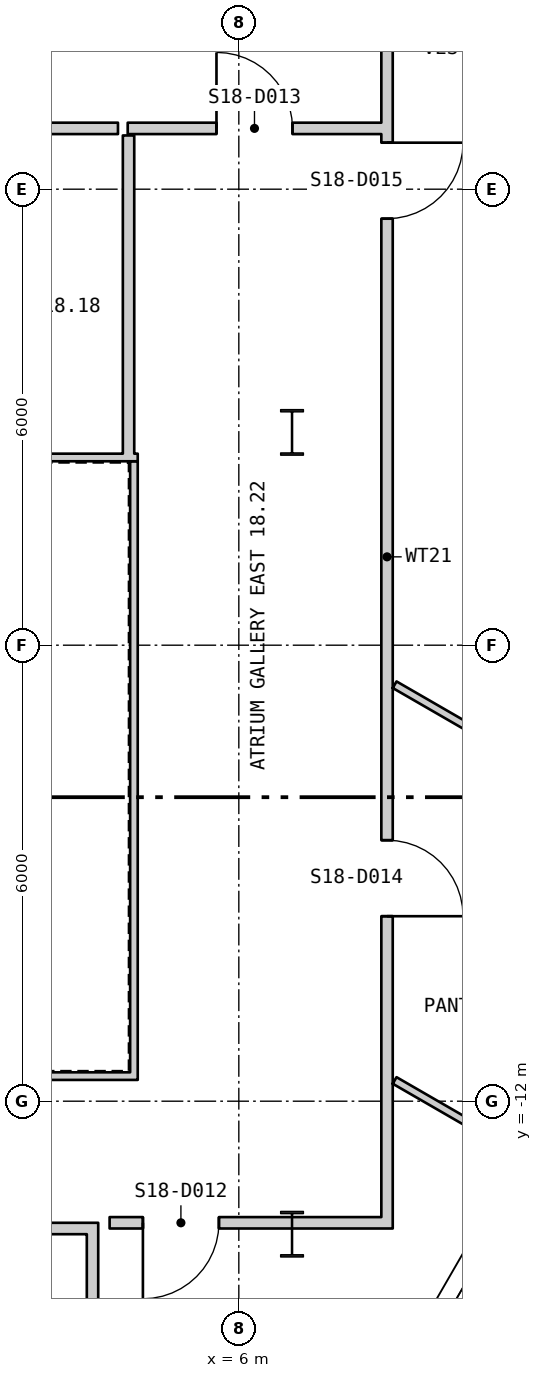
"""IFC4 building model, lengths in metres.
Left out: names, types, materials, properties, quantities, classifications, styles, units other than length and angle.
Written with IfcOpenShell. Run it as: python <this file> out.ifc"""

import sys

from ifc_helpers import new_model, si_unit, direction, frame, frame_2d, origin, origin_2d, place, context, subcontext, project, spatial, polyline, rectangle, i_section, outline, extrude, element, fill, save


model = new_model("IFC4")
c1 = context("Model", 3, precision=1e-05, world=origin(), true_north=direction((0.0, 1.0)))
c2 = subcontext(c1, "Body", "Model", "MODEL_VIEW")
j1 = project(units=[si_unit("LENGTHUNIT", "METRE"), si_unit("PLANEANGLEUNIT", "RADIAN")], contexts=[c1])
p1 = place(None, origin())
s1 = spatial("IfcSite", under=j1, at=p1, CompositionType="ELEMENT")
p2 = place(p1, origin())
s2 = spatial("IfcBuilding", under=s1, at=p2, CompositionType="ELEMENT")
p3 = place(p2, frame((0.0, 0.0, 245.4)))
s3 = spatial("IfcBuildingStorey", under=s2, at=p3, CompositionType="ELEMENT", Elevation=245.4)
for number, where, z_axis, x_axis in (
    (1, (6.7, -3.2, 0.0), (0.0, 0.0, 1.0), (1.0, 0.0, 0.0)),
    (2, (6.7, -13.75, 0.0), (0.0, 0.0, 1.0), (1.0, 0.0, 0.0)),
):
    element("IfcColumn", number, at=place(p3, frame(where, z_axis=z_axis, x_axis=x_axis)), inside=s3, PredefinedType="COLUMN", context=c2, shape_type="SweptSolid", body=[
        extrude(i_section(OverallWidth=0.3, OverallDepth=0.6, WebThickness=0.015, FlangeThickness=0.03, at=origin_2d()), origin(), (0.0, 0.0, 1.0), 3.9),
    ])
p4 = place(p3, frame((2.975, -24.799, -0.18), z_axis=(0.0, 0.0, 1.0), x_axis=(0.500000335318, 0.866025210188, 0.0)))
e3 = element("IfcWall", 3, at=p4, inside=s3, PredefinedType="SOLIDWALL", context=c2, shape_type="SweptSolid", body=[
    extrude(outline(polyline([(-0.13, -0.225), (45.88, -0.225), (45.62, 0.225), (0.13, 0.225), (-0.13, -0.225)])), origin(), (0.0, 0.0, 1.0), 3.68),
])
p5 = place(p4, frame((1.425, 0.0, 1.08)))
e4 = element("IfcOpeningElement", 4, at=p5, cuts=e3, PredefinedType="OPENING", context=c2, shape_type="SweptSolid", body=[
    extrude(rectangle(XDim=2.4, YDim=2.0, at=frame_2d((1.2, 1.0))), frame((0.0, 0.235, 0.0), z_axis=(0.0, -1.0, 0.0), x_axis=(1.0, 0.0, 0.0)), (0.0, 0.0, 1.0), 0.47),
])
p6 = place(p4, frame((5.895, 0.0, 1.08)))
e5 = element("IfcOpeningElement", 5, at=p6, cuts=e3, PredefinedType="OPENING", context=c2, shape_type="SweptSolid", body=[
    extrude(rectangle(XDim=2.4, YDim=2.0, at=frame_2d((1.2, 1.0))), frame((0.0, 0.235, 0.0), z_axis=(0.0, -1.0, 0.0), x_axis=(1.0, 0.0, 0.0)), (0.0, 0.0, 1.0), 0.47),
])
p7 = place(p4, frame((10.403, 0.0, 1.08)))
e6 = element("IfcOpeningElement", 6, at=p7, cuts=e3, PredefinedType="OPENING", context=c2, shape_type="SweptSolid", body=[
    extrude(rectangle(XDim=2.4, YDim=2.0, at=frame_2d((1.2, 1.0))), frame((0.0, 0.235, 0.0), z_axis=(0.0, -1.0, 0.0), x_axis=(1.0, 0.0, 0.0)), (0.0, 0.0, 1.0), 0.47),
])
p8 = place(p4, frame((14.912, 0.0, 1.08)))
e7 = element("IfcOpeningElement", 7, at=p8, cuts=e3, PredefinedType="OPENING", context=c2, shape_type="SweptSolid", body=[
    extrude(rectangle(XDim=2.4, YDim=2.0, at=frame_2d((1.2, 1.0))), frame((0.0, 0.235, 0.0), z_axis=(0.0, -1.0, 0.0), x_axis=(1.0, 0.0, 0.0)), (0.0, 0.0, 1.0), 0.47),
])
p9 = place(p4, frame((19.421, 0.0, 1.08)))
e8 = element("IfcOpeningElement", 8, at=p9, cuts=e3, PredefinedType="OPENING", context=c2, shape_type="SweptSolid", body=[
    extrude(rectangle(XDim=2.4, YDim=2.0, at=frame_2d((1.2, 1.0))), frame((0.0, 0.235, 0.0), z_axis=(0.0, -1.0, 0.0), x_axis=(1.0, 0.0, 0.0)), (0.0, 0.0, 1.0), 0.47),
])
p10 = place(p4, frame((23.929, 0.0, 1.08)))
e9 = element("IfcOpeningElement", 9, at=p10, cuts=e3, PredefinedType="OPENING", context=c2, shape_type="SweptSolid", body=[
    extrude(rectangle(XDim=2.4, YDim=2.0, at=frame_2d((1.2, 1.0))), frame((0.0, 0.235, 0.0), z_axis=(0.0, -1.0, 0.0), x_axis=(1.0, 0.0, 0.0)), (0.0, 0.0, 1.0), 0.47),
])
p11 = place(p4, frame((28.438, 0.0, 1.08)))
e10 = element("IfcOpeningElement", 10, at=p11, cuts=e3, PredefinedType="OPENING", context=c2, shape_type="SweptSolid", body=[
    extrude(rectangle(XDim=2.4, YDim=2.0, at=frame_2d((1.2, 1.0))), frame((0.0, 0.235, 0.0), z_axis=(0.0, -1.0, 0.0), x_axis=(1.0, 0.0, 0.0)), (0.0, 0.0, 1.0), 0.47),
])
p12 = place(p4, frame((32.947, 0.0, 1.08)))
e11 = element("IfcOpeningElement", 11, at=p12, cuts=e3, PredefinedType="OPENING", context=c2, shape_type="SweptSolid", body=[
    extrude(rectangle(XDim=2.4, YDim=2.0, at=frame_2d((1.2, 1.0))), frame((0.0, 0.235, 0.0), z_axis=(0.0, -1.0, 0.0), x_axis=(1.0, 0.0, 0.0)), (0.0, 0.0, 1.0), 0.47),
])
p13 = place(p4, frame((37.455, 0.0, 1.08)))
e12 = element("IfcOpeningElement", 12, at=p13, cuts=e3, PredefinedType="OPENING", context=c2, shape_type="SweptSolid", body=[
    extrude(rectangle(XDim=2.4, YDim=2.0, at=frame_2d((1.2, 1.0))), frame((0.0, 0.235, 0.0), z_axis=(0.0, -1.0, 0.0), x_axis=(1.0, 0.0, 0.0)), (0.0, 0.0, 1.0), 0.47),
])
p14 = place(p4, frame((41.925, 0.0, 1.08)))
e13 = element("IfcOpeningElement", 13, at=p14, cuts=e3, PredefinedType="OPENING", context=c2, shape_type="SweptSolid", body=[
    extrude(rectangle(XDim=2.4, YDim=2.0, at=frame_2d((1.2, 1.0))), frame((0.0, 0.235, 0.0), z_axis=(0.0, -1.0, 0.0), x_axis=(1.0, 0.0, 0.0)), (0.0, 0.0, 1.0), 0.47),
])
p15 = place(p3, frame((-4.67, -11.67, 0.0), z_axis=(0.0, 0.0, 1.0), x_axis=(1.0, 0.0, 0.0)))
e14 = element("IfcWall", 14, at=p15, inside=s3, PredefinedType="PARTITIONING", context=c2, shape_type="SweptSolid", body=[
    extrude(rectangle(XDim=9.34, YDim=0.1, at=frame_2d((4.67, 0.0))), origin(), (0.0, 0.0, 1.0), 3.7),
])
p16 = place(p3, frame((4.62, -11.62, 0.0), z_axis=(0.0, 0.0, 1.0), x_axis=(0.0, 1.0, 0.0)))
e15 = element("IfcWall", 15, at=p16, inside=s3, PredefinedType="PARTITIONING", context=c2, shape_type="SweptSolid", body=[
    extrude(rectangle(XDim=8.04, YDim=0.1, at=frame_2d((4.02, 0.0))), origin(), (0.0, 0.0, 1.0), 3.7),
])
p17 = place(p3, frame((4.67, -3.53, 0.0), z_axis=(0.0, 0.0, 1.0), x_axis=(-1.0, 0.0, 0.0)))
e16 = element("IfcWall", 16, at=p17, inside=s3, PredefinedType="PARTITIONING", context=c2, shape_type="SweptSolid", body=[
    extrude(rectangle(XDim=9.34, YDim=0.1, at=frame_2d((4.67, 0.0))), origin(), (0.0, 0.0, 1.0), 3.7),
])
p18 = place(p3, frame((4.075, -16.15, 0.0), z_axis=(0.0, 0.0, 1.0), x_axis=(0.0, 1.0, 0.0)))
e17 = element("IfcWall", 17, at=p18, inside=s3, PredefinedType="PARTITIONING", context=c2, shape_type="SweptSolid", body=[
    extrude(rectangle(XDim=2.4, YDim=0.15, at=frame_2d((1.2, 0.0))), origin(), (0.0, 0.0, 1.0), 3.7),
])
p19 = place(p3, frame((1.55, -13.675, 0.0), z_axis=(0.0, 0.0, 1.0), x_axis=(1.0, 0.0, 0.0)))
e18 = element("IfcWall", 18, at=p19, inside=s3, PredefinedType="PARTITIONING", context=c2, shape_type="SweptSolid", body=[
    extrude(rectangle(XDim=2.6, YDim=0.15, at=frame_2d((1.3, 0.0))), origin(), (0.0, 0.0, 1.0), 2.91),
])
p20 = place(p19, frame((0.675, 0.0, 0.0)))
e19 = element("IfcOpeningElement", 19, at=p20, cuts=e18, PredefinedType="OPENING", context=c2, shape_type="SweptSolid", body=[
    extrude(rectangle(XDim=1.25, YDim=2.1, at=frame_2d((0.625, 1.05))), frame((0.0, 0.085, 0.0), z_axis=(0.0, -1.0, 0.0), x_axis=(1.0, 0.0, 0.0)), (0.0, 0.0, 1.0), 0.17),
])
p21 = place(p3, frame((-4.41, 0.8, 0.0), z_axis=(0.0, 0.0, 1.0), x_axis=(1.0, 0.0, 0.0)))
e20 = element("IfcWall", 20, at=p21, inside=s3, PredefinedType="PARTITIONING", context=c2, shape_type="SweptSolid", body=[
    extrude(rectangle(XDim=8.82, YDim=0.15, at=frame_2d((4.41, 0.0))), origin(), (0.0, 0.0, 1.0), 3.7),
])
p22 = place(p21, frame((3.106, 0.0, 0.0)))
e21 = element("IfcOpeningElement", 21, at=p22, cuts=e20, PredefinedType="OPENING", context=c2, shape_type="SweptSolid", body=[
    extrude(rectangle(XDim=1.0, YDim=2.1, at=frame_2d((0.5, 1.05))), frame((0.0, 0.085, 0.0), z_axis=(0.0, -1.0, 0.0), x_axis=(1.0, 0.0, 0.0)), (0.0, 0.0, 1.0), 0.17),
])
p23 = place(p21, frame((4.611, 0.0, 0.0)))
e22 = element("IfcOpeningElement", 22, at=p23, cuts=e20, PredefinedType="OPENING", context=c2, shape_type="SweptSolid", body=[
    extrude(rectangle(XDim=1.0, YDim=2.1, at=frame_2d((0.5, 1.05))), frame((0.0, 0.085, 0.0), z_axis=(0.0, -1.0, 0.0), x_axis=(1.0, 0.0, 0.0)), (0.0, 0.0, 1.0), 0.17),
])
p24 = place(p3, frame((4.3, -13.6, 0.0), z_axis=(0.0, 0.0, 1.0), x_axis=(1.0, 0.0, 0.0)))
e23 = element("IfcWall", 23, at=p24, inside=s3, PredefinedType="PARTITIONING", context=c2, shape_type="SweptSolid", body=[
    extrude(rectangle(XDim=2.4, YDim=0.15, at=frame_2d((1.2, 0.0))), origin(), (0.0, 0.0, 1.0), 2.91),
])
p25 = place(p24, frame((0.438, 0.0, 0.0)))
e24 = element("IfcOpeningElement", 24, at=p25, cuts=e23, PredefinedType="OPENING", context=c2, shape_type="SweptSolid", body=[
    extrude(rectangle(XDim=1.0, YDim=2.1, at=frame_2d((0.5, 1.05))), frame((0.0, 0.085, 0.0), z_axis=(0.0, -1.0, 0.0), x_axis=(1.0, 0.0, 0.0)), (0.0, 0.0, 1.0), 0.17),
])
p26 = place(p3, frame((6.7, -13.6, 0.0), z_axis=(0.0, 0.0, 1.0), x_axis=(1.0, 0.0, 0.0)))
e25 = element("IfcWall", 25, at=p26, inside=s3, PredefinedType="PARTITIONING", context=c2, shape_type="SweptSolid", body=[
    extrude(rectangle(XDim=1.175, YDim=0.15, at=frame_2d((0.588, 0.0))), origin(), (0.0, 0.0, 1.0), 3.16),
])
p27 = place(p3, frame((4.538, 0.8, 0.0), z_axis=(0.0, 0.0, 1.0), x_axis=(1.0, 0.0, 0.0)))
e26 = element("IfcWall", 26, at=p27, inside=s3, PredefinedType="PARTITIONING", context=c2, shape_type="SweptSolid", body=[
    extrude(rectangle(XDim=3.337, YDim=0.15, at=frame_2d((1.669, 0.0))), origin(), (0.0, 0.0, 1.0), 3.7),
])
p28 = place(p27, frame((1.168, 0.0, 0.0)))
e27 = element("IfcOpeningElement", 27, at=p28, cuts=e26, PredefinedType="OPENING", context=c2, shape_type="SweptSolid", body=[
    extrude(rectangle(XDim=1.0, YDim=2.1, at=frame_2d((0.5, 1.05))), frame((0.0, 0.085, 0.0), z_axis=(0.0, -1.0, 0.0), x_axis=(1.0, 0.0, 0.0)), (0.0, 0.0, 1.0), 0.17),
])
p29 = place(p3, frame((4.549, -3.48, 0.0), z_axis=(0.0, 0.0, 1.0), x_axis=(0.0, 1.0, 0.0)))
e28 = element("IfcWall", 28, at=p29, inside=s3, PredefinedType="PARTITIONING", context=c2, shape_type="SweptSolid", body=[
    extrude(rectangle(XDim=4.187, YDim=0.15, at=frame_2d((2.094, 0.0))), origin(), (0.0, 0.0, 1.0), 3.7),
])
p30 = place(p3, frame((7.95, -13.675, 0.0), z_axis=(0.0, 0.0, 1.0), x_axis=(0.0, 1.0, 0.0)))
e29 = element("IfcWall", 29, at=p30, inside=s3, PredefinedType="PARTITIONING", context=c2, shape_type="SweptSolid", body=[
    extrude(rectangle(XDim=17.675, YDim=0.15, at=frame_2d((8.838, 0.0))), origin(), (0.0, 0.0, 1.0), 3.7),
])
p31 = place(p30, frame((4.109, 0.0, 0.0)))
e30 = element("IfcOpeningElement", 30, at=p31, cuts=e29, PredefinedType="OPENING", context=c2, shape_type="SweptSolid", body=[
    extrude(rectangle(XDim=1.0, YDim=2.1, at=frame_2d((0.5, 1.05))), frame((0.0, 0.085, 0.0), z_axis=(0.0, -1.0, 0.0), x_axis=(1.0, 0.0, 0.0)), (0.0, 0.0, 1.0), 0.17),
])
p32 = place(p30, frame((13.287, 0.0, 0.0)))
e31 = element("IfcOpeningElement", 31, at=p32, cuts=e29, PredefinedType="OPENING", context=c2, shape_type="SweptSolid", body=[
    extrude(rectangle(XDim=1.0, YDim=2.1, at=frame_2d((0.5, 1.05))), frame((0.0, 0.085, 0.0), z_axis=(0.0, -1.0, 0.0), x_axis=(1.0, 0.0, 0.0)), (0.0, 0.0, 1.0), 0.17),
])
p33 = place(p30, frame((16.275, 0.0, 0.0)))
e32 = element("IfcOpeningElement", 32, at=p33, cuts=e29, PredefinedType="OPENING", context=c2, shape_type="SweptSolid", body=[
    extrude(rectangle(XDim=1.0, YDim=2.1, at=frame_2d((0.5, 1.05))), frame((0.0, 0.085, 0.0), z_axis=(0.0, -1.0, 0.0), x_axis=(1.0, 0.0, 0.0)), (0.0, 0.0, 1.0), 0.17),
])
p34 = place(p3, frame((8.05, -6.52, 0.0), z_axis=(0.0, 0.0, 1.0), x_axis=(0.865980959039, -0.500076972657, 0.0)))
e33 = element("IfcWall", 33, at=p34, inside=s3, PredefinedType="PARTITIONING", context=c2, shape_type="SweptSolid", body=[
    extrude(rectangle(XDim=4.069, YDim=0.1, at=frame_2d((2.035, 0.0))), origin(), (0.0, 0.0, 1.0), 3.7),
])
p35 = place(p3, frame((8.05, -11.727, 0.0), z_axis=(0.0, 0.0, 1.0), x_axis=(0.865924183809, -0.500175277173, 0.0)))
e34 = element("IfcWall", 34, at=p35, inside=s3, PredefinedType="PARTITIONING", context=c2, shape_type="SweptSolid", body=[
    extrude(rectangle(XDim=1.466, YDim=0.1, at=frame_2d((0.733, 0.0))), origin(), (0.0, 0.0, 1.0), 3.7),
])
p36 = place(p7, origin())
e35 = element("IfcWindow", 35, at=p36, inside=s3, PartitioningType="SINGLE_PANEL", PredefinedType="WINDOW", context=c2, shape_type="SweptSolid", body=[
    extrude(rectangle(XDim=2.4, YDim=2.0, at=frame_2d((1.2, 1.0))), frame((0.0, 0.105, 0.0), z_axis=(0.0, -1.0, 0.0), x_axis=(1.0, 0.0, 0.0)), (0.0, 0.0, 1.0), 0.06),
])
fill(e6, e35)
p37 = place(p25, origin())
e36 = element("IfcDoor", 36, at=p37, inside=s3, OperationType="SINGLE_SWING_LEFT", PredefinedType="DOOR", context=c2, shape_type="SweptSolid", body=[
    extrude(rectangle(XDim=1.0, YDim=2.1, at=frame_2d((0.5, 1.05))), frame((0.0, 0.025, 0.0), z_axis=(0.0, -1.0, 0.0), x_axis=(1.0, 0.0, 0.0)), (0.0, 0.0, 1.0), 0.05),
])
fill(e24, e36)
p38 = place(p28, origin())
e37 = element("IfcDoor", 37, at=p38, inside=s3, OperationType="SINGLE_SWING_RIGHT", PredefinedType="DOOR", context=c2, shape_type="SweptSolid", body=[
    extrude(rectangle(XDim=1.0, YDim=2.1, at=frame_2d((0.5, 1.05))), frame((0.0, 0.025, 0.0), z_axis=(0.0, -1.0, 0.0), x_axis=(1.0, 0.0, 0.0)), (0.0, 0.0, 1.0), 0.05),
])
fill(e27, e37)
p39 = place(p31, origin())
e38 = element("IfcDoor", 38, at=p39, inside=s3, OperationType="SINGLE_SWING_LEFT", PredefinedType="DOOR", context=c2, shape_type="SweptSolid", body=[
    extrude(rectangle(XDim=1.0, YDim=2.1, at=frame_2d((0.5, 1.05))), frame((0.0, 0.025, 0.0), z_axis=(0.0, -1.0, 0.0), x_axis=(1.0, 0.0, 0.0)), (0.0, 0.0, 1.0), 0.05),
])
fill(e30, e38)
p40 = place(p32, origin())
e39 = element("IfcDoor", 39, at=p40, inside=s3, OperationType="SINGLE_SWING_RIGHT", PredefinedType="DOOR", context=c2, shape_type="SweptSolid", body=[
    extrude(rectangle(XDim=1.0, YDim=2.1, at=frame_2d((0.5, 1.05))), frame((0.0, 0.025, 0.0), z_axis=(0.0, -1.0, 0.0), x_axis=(1.0, 0.0, 0.0)), (0.0, 0.0, 1.0), 0.05),
])
fill(e31, e39)
save(model, sys.argv[1])
